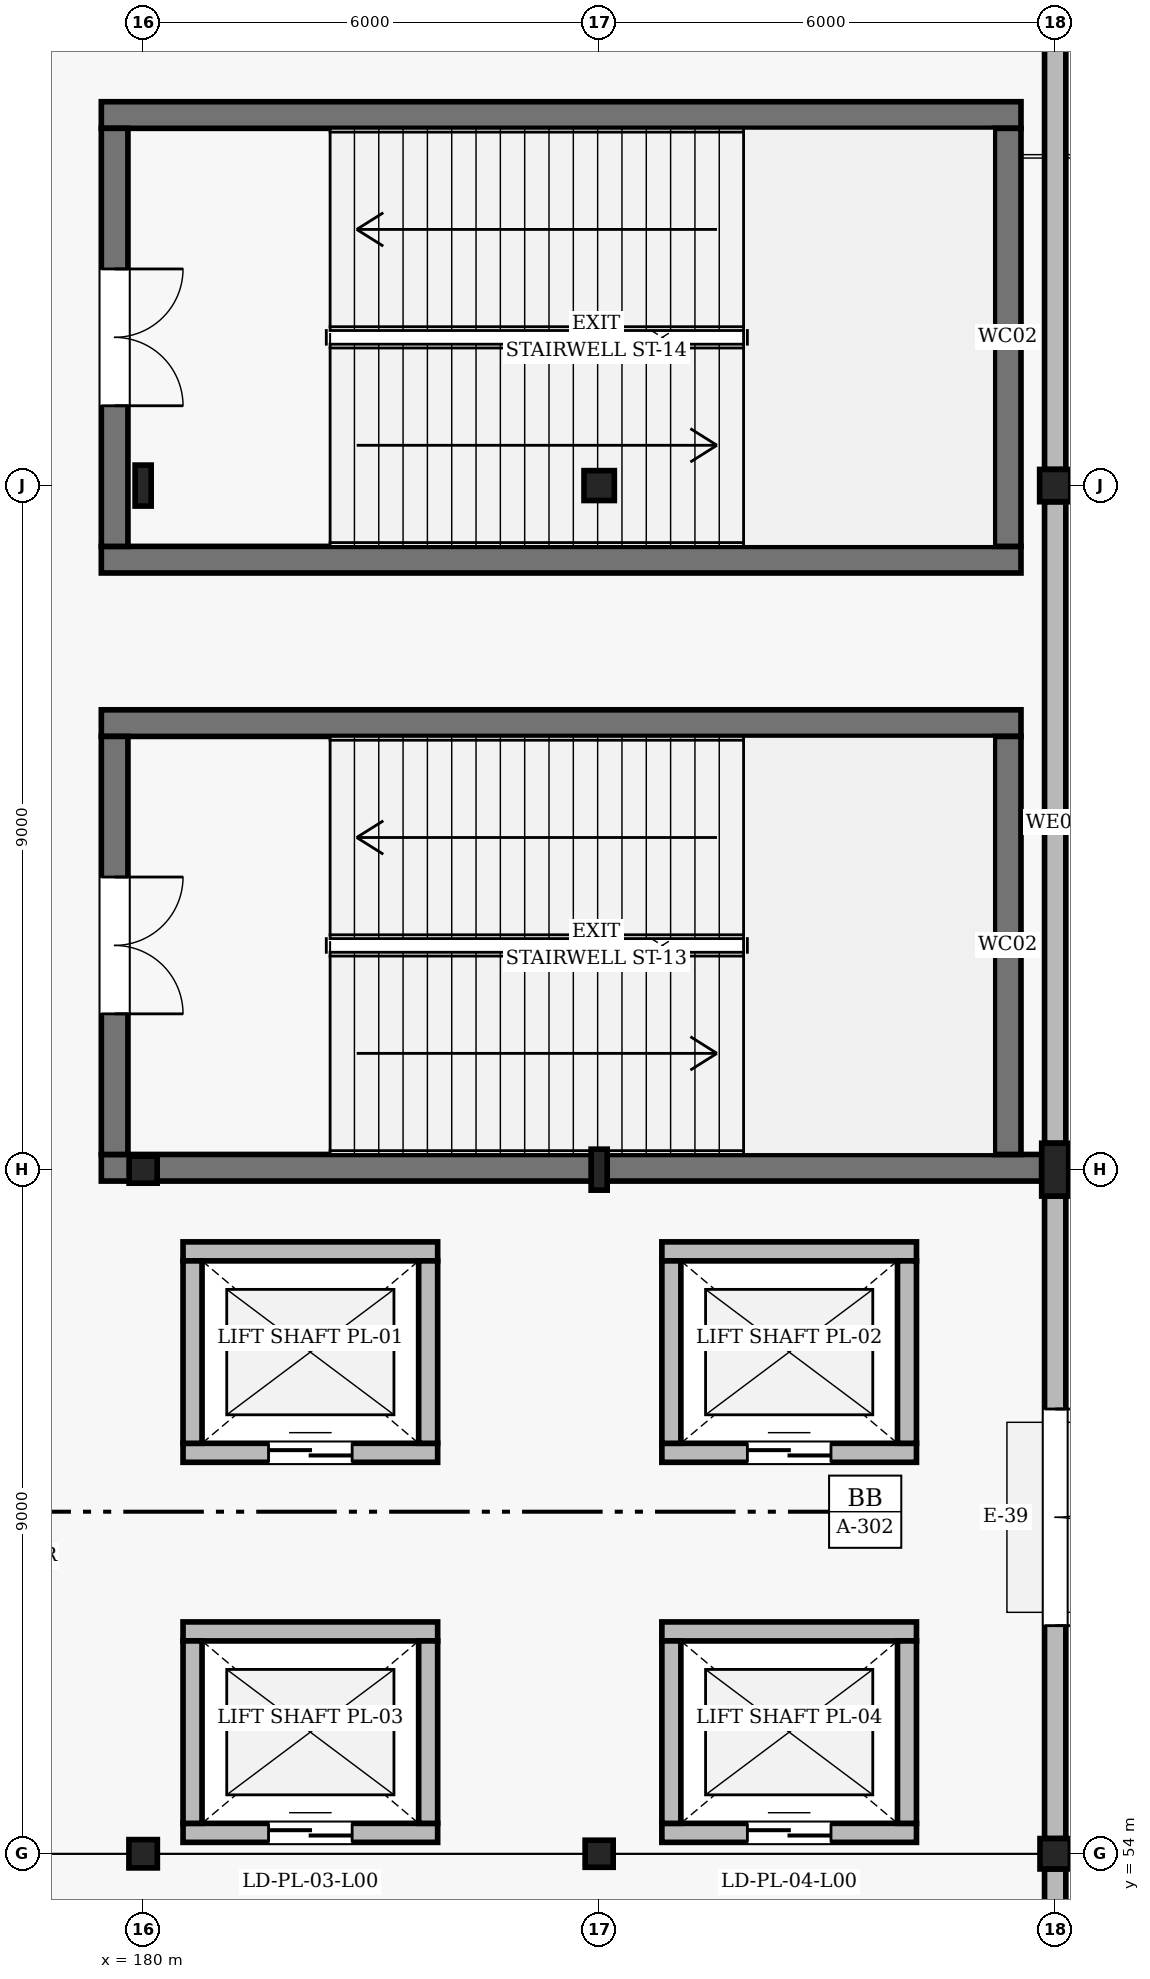
"""IFC4 building model, lengths in metres.
Left out: names, types, materials, properties, quantities, classifications, styles, units other than length and angle.
Written with IfcOpenShell. Run it as: python <this file> out.ifc"""

import sys

from ifc_helpers import new_model, si_unit, direction, frame, frame_2d, origin, origin_2d, place, context, subcontext, project, spatial, rectangle, hollow_rectangle, i_section, extrude, element, fill, save


model = new_model("IFC4")
c1 = context("Model", 3, precision=1e-05, world=origin(), true_north=direction((0.0, 1.0)))
c2 = subcontext(c1, "Body", "Model", "MODEL_VIEW")
j1 = project(units=[si_unit("LENGTHUNIT", "METRE"), si_unit("PLANEANGLEUNIT", "RADIAN")], contexts=[c1])
p1 = place(None, origin())
s1 = spatial("IfcSite", under=j1, at=p1, CompositionType="ELEMENT")
p2 = place(p1, origin())
s2 = spatial("IfcBuilding", under=s1, at=p2, CompositionType="ELEMENT")
p3 = place(p2, origin())
s3 = spatial("IfcBuildingStorey", under=s2, at=p3, CompositionType="ELEMENT", Elevation=0.0)
p4 = place(p3, frame((180.0, 54.0, 0.0), z_axis=(0.0, 0.0, 1.0), x_axis=(1.0, 0.0, 0.0)))
e1 = element("IfcColumn", 1, at=p4, inside=s3, PredefinedType="COLUMN", context=c2, shape_type="SweptSolid", body=[
    extrude(i_section(OverallWidth=0.374, OverallDepth=0.372, WebThickness=0.016, FlangeThickness=0.026, FilletRadius=0.016, at=origin_2d()), origin(), (0.0, 0.0, 1.0), 5.4),
])
p5 = place(p3, frame((180.0, 63.0, 0.0), z_axis=(0.0, 0.0, 1.0), x_axis=(1.0, 0.0, 0.0)))
e2 = element("IfcColumn", 2, at=p5, inside=s3, PredefinedType="COLUMN", context=c2, shape_type="SweptSolid", body=[
    extrude(i_section(OverallWidth=0.369, OverallDepth=0.356, WebThickness=0.011, FlangeThickness=0.018, FilletRadius=0.015, at=origin_2d()), origin(), (0.0, 0.0, 1.0), 5.4),
])
p6 = place(p3, frame((180.0, 72.0, 0.0), z_axis=(0.0, 0.0, 1.0), x_axis=(1.0, 0.0, 0.0)))
e3 = element("IfcColumn", 3, at=p6, inside=s3, PredefinedType="COLUMN", context=c2, shape_type="SweptSolid", body=[
    extrude(i_section(OverallWidth=0.211, OverallDepth=0.539, WebThickness=0.012, FlangeThickness=0.019, FilletRadius=0.014, at=origin_2d()), origin(), (0.0, 0.0, 1.0), 5.4),
])
p7 = place(p3, frame((186.0, 54.0, 0.0), z_axis=(0.0, 0.0, 1.0), x_axis=(1.0, 0.0, 0.0)))
e4 = element("IfcColumn", 4, at=p7, inside=s3, PredefinedType="COLUMN", context=c2, shape_type="SweptSolid", body=[
    extrude(i_section(OverallWidth=0.369, OverallDepth=0.356, WebThickness=0.011, FlangeThickness=0.018, FilletRadius=0.015, at=origin_2d()), origin(), (0.0, 0.0, 1.0), 5.4),
])
p8 = place(p3, frame((186.0, 63.0, 0.0), z_axis=(0.0, 0.0, 1.0), x_axis=(1.0, 0.0, 0.0)))
e5 = element("IfcColumn", 5, at=p8, inside=s3, PredefinedType="COLUMN", context=c2, shape_type="SweptSolid", body=[
    extrude(i_section(OverallWidth=0.211, OverallDepth=0.539, WebThickness=0.012, FlangeThickness=0.019, FilletRadius=0.014, at=origin_2d()), origin(), (0.0, 0.0, 1.0), 5.4),
])
p9 = place(p3, frame((186.0, 72.0, 0.0), z_axis=(0.0, 0.0, 1.0), x_axis=(1.0, 0.0, 0.0)))
e6 = element("IfcColumn", 6, at=p9, inside=s3, PredefinedType="COLUMN", context=c2, shape_type="SweptSolid", body=[
    extrude(i_section(OverallWidth=0.399, OverallDepth=0.393, WebThickness=0.023, FlangeThickness=0.037, FilletRadius=0.018, at=origin_2d()), origin(), (0.0, 0.0, 1.0), 5.4),
])
p10 = place(p3, frame((192.0, 54.0, 0.0), z_axis=(0.0, 0.0, 1.0), x_axis=(1.0, 0.0, 0.0)))
e7 = element("IfcColumn", 7, at=p10, inside=s3, PredefinedType="COLUMN", context=c2, shape_type="SweptSolid", body=[
    extrude(hollow_rectangle(XDim=0.4, YDim=0.4, WallThickness=0.016, InnerFilletRadius=0.016, OuterFilletRadius=0.032, at=origin_2d()), origin(), (0.0, 0.0, 1.0), 5.4),
])
p11 = place(p3, frame((192.0, 63.0, 0.0), z_axis=(0.0, 0.0, 1.0), x_axis=(1.0, 0.0, 0.0)))
e8 = element("IfcColumn", 8, at=p11, inside=s3, PredefinedType="COLUMN", context=c2, shape_type="SweptSolid", body=[
    extrude(i_section(OverallWidth=0.355, OverallDepth=0.695, WebThickness=0.015, FlangeThickness=0.025, FilletRadius=0.018, at=origin_2d()), origin(), (0.0, 0.0, 1.0), 5.4),
])
p12 = place(p3, frame((192.0, 72.0, 0.0), z_axis=(0.0, 0.0, 1.0), x_axis=(1.0, 0.0, 0.0)))
e9 = element("IfcColumn", 9, at=p12, inside=s3, PredefinedType="COLUMN", context=c2, shape_type="SweptSolid", body=[
    extrude(i_section(OverallWidth=0.409, OverallDepth=0.425, WebThickness=0.031, FlangeThickness=0.049, FilletRadius=0.02, at=origin_2d()), origin(), (0.0, 0.0, 1.0), 5.4),
])
p13 = place(p3, frame((192.0, 53.8, 0.0), z_axis=(0.0, 0.0, 1.0), x_axis=(0.0, -1.0, 0.0)))
e10 = element("IfcWall", 10, at=p13, inside=s3, PredefinedType="SOLIDWALL", context=c2, shape_type="SweptSolid", body=[
    extrude(rectangle(XDim=8.25, YDim=0.28, at=frame_2d((4.125, 0.0))), origin(), (0.0, 0.0, 1.0), 4.626),
])
p14 = place(p13, frame((2.75, 0.0, 0.0)))
e11 = element("IfcOpeningElement", 11, at=p14, cuts=e10, PredefinedType="OPENING", context=c2, shape_type="SweptSolid", body=[
    extrude(rectangle(XDim=2.75, YDim=2.58, at=frame_2d((1.375, 1.29))), frame((0.0, 0.15, 0.0), z_axis=(0.0, -1.0, 0.0), x_axis=(1.0, 0.0, 0.0)), (0.0, 0.0, 1.0), 0.3),
])
p15 = place(p3, frame((192.0, 62.653, 0.0), z_axis=(0.0, 0.0, 1.0), x_axis=(0.0, -1.0, 0.0)))
e12 = element("IfcWall", 12, at=p15, inside=s3, PredefinedType="SOLIDWALL", context=c2, shape_type="SweptSolid", body=[
    extrude(rectangle(XDim=8.453, YDim=0.28, at=frame_2d((4.226, 0.0))), origin(), (0.0, 0.0, 1.0), 4.699),
])
p16 = place(p15, frame((2.801, 0.0, 0.0)))
e13 = element("IfcOpeningElement", 13, at=p16, cuts=e12, PredefinedType="OPENING", context=c2, shape_type="SweptSolid", body=[
    extrude(rectangle(XDim=2.85, YDim=2.62, at=frame_2d((1.425, 1.31))), frame((0.0, 0.15, 0.0), z_axis=(0.0, -1.0, 0.0), x_axis=(1.0, 0.0, 0.0)), (0.0, 0.0, 1.0), 0.3),
])
p17 = place(p3, frame((192.0, 71.788, 0.0), z_axis=(0.0, 0.0, 1.0), x_axis=(0.0, -1.0, 0.0)))
e14 = element("IfcWall", 14, at=p17, inside=s3, PredefinedType="SOLIDWALL", context=c2, shape_type="SweptSolid", body=[
    extrude(rectangle(XDim=8.44, YDim=0.28, at=frame_2d((4.22, 0.0))), origin(), (0.0, 0.0, 1.0), 4.865),
])
p18 = place(p3, frame((192.0, 80.45, 0.0), z_axis=(0.0, 0.0, 1.0), x_axis=(0.0, -1.0, 0.0)))
e15 = element("IfcWall", 15, at=p18, inside=s3, PredefinedType="SOLIDWALL", context=c2, shape_type="SweptSolid", body=[
    extrude(rectangle(XDim=8.238, YDim=0.28, at=frame_2d((4.119, 0.0))), origin(), (0.0, 0.0, 1.0), 4.626),
])
p19 = place(p3, frame((179.45, 63.025, 0.0), z_axis=(0.0, 0.0, 1.0), x_axis=(1.0, 0.0, 0.0)))
e16 = element("IfcWall", 16, at=p19, inside=s3, PredefinedType="SHEAR", context=c2, shape_type="SweptSolid", body=[
    extrude(rectangle(XDim=12.373, YDim=0.35, at=frame_2d((6.186, 0.0))), origin(), (0.0, 0.0, 1.0), 5.18),
])
p20 = place(p3, frame((191.55, 68.875, 0.0), z_axis=(0.0, 0.0, 1.0), x_axis=(-1.0, 0.0, 0.0)))
e17 = element("IfcWall", 17, at=p20, inside=s3, PredefinedType="SHEAR", context=c2, shape_type="SweptSolid", body=[
    extrude(rectangle(XDim=12.1, YDim=0.35, at=frame_2d((6.05, 0.0))), origin(), (0.0, 0.0, 1.0), 5.18),
])
p21 = place(p3, frame((179.625, 68.7, 0.0), z_axis=(0.0, 0.0, 1.0), x_axis=(0.0, -1.0, 0.0)))
e18 = element("IfcWall", 18, at=p21, inside=s3, PredefinedType="SHEAR", context=c2, shape_type="SweptSolid", body=[
    extrude(rectangle(XDim=5.5, YDim=0.35, at=frame_2d((2.75, 0.0))), origin(), (0.0, 0.0, 1.0), 5.18),
])
p22 = place(p21, frame((1.85, 0.0, 0.0)))
e19 = element("IfcOpeningElement", 19, at=p22, cuts=e18, PredefinedType="OPENING", context=c2, shape_type="SweptSolid", body=[
    extrude(rectangle(XDim=1.8, YDim=2.2, at=frame_2d((0.9, 1.1))), frame((0.0, 0.185, 0.0), z_axis=(0.0, -1.0, 0.0), x_axis=(1.0, 0.0, 0.0)), (0.0, 0.0, 1.0), 0.37),
])
p23 = place(p3, frame((191.375, 63.2, 0.0), z_axis=(0.0, 0.0, 1.0), x_axis=(0.0, 1.0, 0.0)))
e20 = element("IfcWall", 20, at=p23, inside=s3, PredefinedType="SHEAR", context=c2, shape_type="SweptSolid", body=[
    extrude(rectangle(XDim=5.5, YDim=0.35, at=frame_2d((2.75, 0.0))), origin(), (0.0, 0.0, 1.0), 5.18),
])
for number, where, z_axis, x_axis in (
    (21, (179.45, 71.025, 0.0), (0.0, 0.0, 1.0), (1.0, 0.0, 0.0)),
    (22, (191.55, 76.875, 0.0), (0.0, 0.0, 1.0), (-1.0, 0.0, 0.0)),
):
    element("IfcWall", number, at=place(p3, frame(where, z_axis=z_axis, x_axis=x_axis)), inside=s3, PredefinedType="SHEAR", context=c2, shape_type="SweptSolid", body=[
        extrude(rectangle(XDim=12.1, YDim=0.35, at=frame_2d((6.05, 0.0))), origin(), (0.0, 0.0, 1.0), 5.18),
    ])
p24 = place(p3, frame((179.625, 76.7, 0.0), z_axis=(0.0, 0.0, 1.0), x_axis=(0.0, -1.0, 0.0)))
e23 = element("IfcWall", 23, at=p24, inside=s3, PredefinedType="SHEAR", context=c2, shape_type="SweptSolid", body=[
    extrude(rectangle(XDim=5.5, YDim=0.35, at=frame_2d((2.75, 0.0))), origin(), (0.0, 0.0, 1.0), 5.18),
])
p25 = place(p24, frame((1.85, 0.0, 0.0)))
e24 = element("IfcOpeningElement", 24, at=p25, cuts=e23, PredefinedType="OPENING", context=c2, shape_type="SweptSolid", body=[
    extrude(rectangle(XDim=1.8, YDim=2.2, at=frame_2d((0.9, 1.1))), frame((0.0, 0.185, 0.0), z_axis=(0.0, -1.0, 0.0), x_axis=(1.0, 0.0, 0.0)), (0.0, 0.0, 1.0), 0.37),
])
p26 = place(p3, frame((191.375, 71.2, 0.0), z_axis=(0.0, 0.0, 1.0), x_axis=(0.0, 1.0, 0.0)))
e25 = element("IfcWall", 25, at=p26, inside=s3, PredefinedType="SHEAR", context=c2, shape_type="SweptSolid", body=[
    extrude(rectangle(XDim=5.5, YDim=0.35, at=frame_2d((2.75, 0.0))), origin(), (0.0, 0.0, 1.0), 5.18),
])
p27 = place(p3, frame((180.525, 59.275, 0.0), z_axis=(0.0, 0.0, 1.0), x_axis=(1.0, 0.0, 0.0)))
e26 = element("IfcWall", 26, at=p27, inside=s3, PredefinedType="SOLIDWALL", context=c2, shape_type="SweptSolid", body=[
    extrude(rectangle(XDim=3.35, YDim=0.25, at=frame_2d((1.675, 0.0))), origin(), (0.0, 0.0, 1.0), 5.18),
])
p28 = place(p27, frame((1.125, 0.0, 0.0)))
e27 = element("IfcOpeningElement", 27, at=p28, cuts=e26, PredefinedType="OPENING", context=c2, shape_type="SweptSolid", body=[
    extrude(rectangle(XDim=1.1, YDim=2.2, at=frame_2d((0.55, 1.1))), frame((0.0, 0.135, 0.0), z_axis=(0.0, -1.0, 0.0), x_axis=(1.0, 0.0, 0.0)), (0.0, 0.0, 1.0), 0.27),
])
p29 = place(p3, frame((183.875, 61.925, 0.0), z_axis=(0.0, 0.0, 1.0), x_axis=(-1.0, 0.0, 0.0)))
e28 = element("IfcWall", 28, at=p29, inside=s3, PredefinedType="SOLIDWALL", context=c2, shape_type="SweptSolid", body=[
    extrude(rectangle(XDim=3.35, YDim=0.25, at=frame_2d((1.675, 0.0))), origin(), (0.0, 0.0, 1.0), 5.18),
])
for number, where, z_axis, x_axis in (
    (29, (180.65, 61.8, 0.0), (0.0, 0.0, 1.0), (0.0, -1.0, 0.0)),
    (30, (183.75, 59.4, 0.0), (0.0, 0.0, 1.0), (0.0, 1.0, 0.0)),
):
    element("IfcWall", number, at=place(p3, frame(where, z_axis=z_axis, x_axis=x_axis)), inside=s3, PredefinedType="SOLIDWALL", context=c2, shape_type="SweptSolid", body=[
        extrude(rectangle(XDim=2.4, YDim=0.25, at=frame_2d((1.2, 0.0))), origin(), (0.0, 0.0, 1.0), 5.18),
    ])
p30 = place(p3, frame((186.825, 59.275, 0.0), z_axis=(0.0, 0.0, 1.0), x_axis=(1.0, 0.0, 0.0)))
e31 = element("IfcWall", 31, at=p30, inside=s3, PredefinedType="SOLIDWALL", context=c2, shape_type="SweptSolid", body=[
    extrude(rectangle(XDim=3.35, YDim=0.25, at=frame_2d((1.675, 0.0))), origin(), (0.0, 0.0, 1.0), 5.18),
])
p31 = place(p30, frame((1.125, 0.0, 0.0)))
e32 = element("IfcOpeningElement", 32, at=p31, cuts=e31, PredefinedType="OPENING", context=c2, shape_type="SweptSolid", body=[
    extrude(rectangle(XDim=1.1, YDim=2.2, at=frame_2d((0.55, 1.1))), frame((0.0, 0.135, 0.0), z_axis=(0.0, -1.0, 0.0), x_axis=(1.0, 0.0, 0.0)), (0.0, 0.0, 1.0), 0.27),
])
p32 = place(p3, frame((190.175, 61.925, 0.0), z_axis=(0.0, 0.0, 1.0), x_axis=(-1.0, 0.0, 0.0)))
e33 = element("IfcWall", 33, at=p32, inside=s3, PredefinedType="SOLIDWALL", context=c2, shape_type="SweptSolid", body=[
    extrude(rectangle(XDim=3.35, YDim=0.25, at=frame_2d((1.675, 0.0))), origin(), (0.0, 0.0, 1.0), 5.18),
])
for number, where, z_axis, x_axis in (
    (34, (186.95, 61.8, 0.0), (0.0, 0.0, 1.0), (0.0, -1.0, 0.0)),
    (35, (190.05, 59.4, 0.0), (0.0, 0.0, 1.0), (0.0, 1.0, 0.0)),
):
    element("IfcWall", number, at=place(p3, frame(where, z_axis=z_axis, x_axis=x_axis)), inside=s3, PredefinedType="SOLIDWALL", context=c2, shape_type="SweptSolid", body=[
        extrude(rectangle(XDim=2.4, YDim=0.25, at=frame_2d((1.2, 0.0))), origin(), (0.0, 0.0, 1.0), 5.18),
    ])
p33 = place(p3, frame((180.525, 54.275, 0.0), z_axis=(0.0, 0.0, 1.0), x_axis=(1.0, 0.0, 0.0)))
e36 = element("IfcWall", 36, at=p33, inside=s3, PredefinedType="SOLIDWALL", context=c2, shape_type="SweptSolid", body=[
    extrude(rectangle(XDim=3.35, YDim=0.25, at=frame_2d((1.675, 0.0))), origin(), (0.0, 0.0, 1.0), 4.392),
])
p34 = place(p33, frame((1.125, 0.0, 0.0)))
e37 = element("IfcOpeningElement", 37, at=p34, cuts=e36, PredefinedType="OPENING", context=c2, shape_type="SweptSolid", body=[
    extrude(rectangle(XDim=1.1, YDim=2.2, at=frame_2d((0.55, 1.1))), frame((0.0, 0.135, 0.0), z_axis=(0.0, -1.0, 0.0), x_axis=(1.0, 0.0, 0.0)), (0.0, 0.0, 1.0), 0.27),
])
p35 = place(p3, frame((183.875, 56.925, 0.0), z_axis=(0.0, 0.0, 1.0), x_axis=(-1.0, 0.0, 0.0)))
e38 = element("IfcWall", 38, at=p35, inside=s3, PredefinedType="SOLIDWALL", context=c2, shape_type="SweptSolid", body=[
    extrude(rectangle(XDim=3.35, YDim=0.25, at=frame_2d((1.675, 0.0))), origin(), (0.0, 0.0, 1.0), 4.857),
])
for number, where, z_axis, x_axis in (
    (39, (180.65, 56.8, 0.0), (0.0, 0.0, 1.0), (0.0, -1.0, 0.0)),
    (40, (183.75, 54.4, 0.0), (0.0, 0.0, 1.0), (0.0, 1.0, 0.0)),
):
    element("IfcWall", number, at=place(p3, frame(where, z_axis=z_axis, x_axis=x_axis)), inside=s3, PredefinedType="SOLIDWALL", context=c2, shape_type="SweptSolid", body=[
        extrude(rectangle(XDim=2.4, YDim=0.25, at=frame_2d((1.2, 0.0))), origin(), (0.0, 0.0, 1.0), 4.392),
    ])
p36 = place(p3, frame((186.825, 54.275, 0.0), z_axis=(0.0, 0.0, 1.0), x_axis=(1.0, 0.0, 0.0)))
e41 = element("IfcWall", 41, at=p36, inside=s3, PredefinedType="SOLIDWALL", context=c2, shape_type="SweptSolid", body=[
    extrude(rectangle(XDim=3.35, YDim=0.25, at=frame_2d((1.675, 0.0))), origin(), (0.0, 0.0, 1.0), 4.47),
])
p37 = place(p36, frame((1.125, 0.0, 0.0)))
e42 = element("IfcOpeningElement", 42, at=p37, cuts=e41, PredefinedType="OPENING", context=c2, shape_type="SweptSolid", body=[
    extrude(rectangle(XDim=1.1, YDim=2.2, at=frame_2d((0.55, 1.1))), frame((0.0, 0.135, 0.0), z_axis=(0.0, -1.0, 0.0), x_axis=(1.0, 0.0, 0.0)), (0.0, 0.0, 1.0), 0.27),
])
p38 = place(p3, frame((190.175, 56.925, 0.0), z_axis=(0.0, 0.0, 1.0), x_axis=(-1.0, 0.0, 0.0)))
e43 = element("IfcWall", 43, at=p38, inside=s3, PredefinedType="SOLIDWALL", context=c2, shape_type="SweptSolid", body=[
    extrude(rectangle(XDim=3.35, YDim=0.25, at=frame_2d((1.675, 0.0))), origin(), (0.0, 0.0, 1.0), 4.557),
])
for number, where, z_axis, x_axis in (
    (44, (186.95, 56.8, 0.0), (0.0, 0.0, 1.0), (0.0, -1.0, 0.0)),
    (45, (190.05, 54.4, 0.0), (0.0, 0.0, 1.0), (0.0, 1.0, 0.0)),
):
    element("IfcWall", number, at=place(p3, frame(where, z_axis=z_axis, x_axis=x_axis)), inside=s3, PredefinedType="SOLIDWALL", context=c2, shape_type="SweptSolid", body=[
        extrude(rectangle(XDim=2.4, YDim=0.25, at=frame_2d((1.2, 0.0))), origin(), (0.0, 0.0, 1.0), 4.47),
    ])
p39 = place(p16, origin())
e46 = element("IfcDoor", 46, at=p39, inside=s3, OperationType="DOUBLE_DOOR_SINGLE_SWING", PredefinedType="DOOR", context=c2, shape_type="SweptSolid", body=[
    extrude(rectangle(XDim=2.85, YDim=2.62, at=frame_2d((1.425, 1.31))), frame((0.0, 0.025, 0.0), z_axis=(0.0, -1.0, 0.0), x_axis=(1.0, 0.0, 0.0)), (0.0, 0.0, 1.0), 0.05),
])
fill(e13, e46)
p40 = place(p22, origin())
e47 = element("IfcDoor", 47, at=p40, inside=s3, OperationType="DOUBLE_DOOR_SINGLE_SWING", PredefinedType="DOOR", context=c2, shape_type="SweptSolid", body=[
    extrude(rectangle(XDim=1.8, YDim=2.2, at=frame_2d((0.9, 1.1))), frame((0.0, 0.025, 0.0), z_axis=(0.0, -1.0, 0.0), x_axis=(1.0, 0.0, 0.0)), (0.0, 0.0, 1.0), 0.05),
])
fill(e19, e47)
p41 = place(p25, origin())
e48 = element("IfcDoor", 48, at=p41, inside=s3, OperationType="DOUBLE_DOOR_SINGLE_SWING", PredefinedType="DOOR", context=c2, shape_type="SweptSolid", body=[
    extrude(rectangle(XDim=1.8, YDim=2.2, at=frame_2d((0.9, 1.1))), frame((0.0, 0.025, 0.0), z_axis=(0.0, -1.0, 0.0), x_axis=(1.0, 0.0, 0.0)), (0.0, 0.0, 1.0), 0.05),
])
fill(e24, e48)
p42 = place(p28, origin())
e49 = element("IfcDoor", 49, at=p42, inside=s3, OperationType="DOUBLE_DOOR_SLIDING", PredefinedType="DOOR", context=c2, shape_type="SweptSolid", body=[
    extrude(rectangle(XDim=1.1, YDim=2.2, at=frame_2d((0.55, 1.1))), frame((0.0, 0.025, 0.0), z_axis=(0.0, -1.0, 0.0), x_axis=(1.0, 0.0, 0.0)), (0.0, 0.0, 1.0), 0.05),
])
fill(e27, e49)
p43 = place(p31, origin())
e50 = element("IfcDoor", 50, at=p43, inside=s3, OperationType="DOUBLE_DOOR_SLIDING", PredefinedType="DOOR", context=c2, shape_type="SweptSolid", body=[
    extrude(rectangle(XDim=1.1, YDim=2.2, at=frame_2d((0.55, 1.1))), frame((0.0, 0.025, 0.0), z_axis=(0.0, -1.0, 0.0), x_axis=(1.0, 0.0, 0.0)), (0.0, 0.0, 1.0), 0.05),
])
fill(e32, e50)
p44 = place(p34, origin())
e51 = element("IfcDoor", 51, at=p44, inside=s3, OperationType="DOUBLE_DOOR_SLIDING", PredefinedType="DOOR", context=c2, shape_type="SweptSolid", body=[
    extrude(rectangle(XDim=1.1, YDim=2.2, at=frame_2d((0.55, 1.1))), frame((0.0, 0.025, 0.0), z_axis=(0.0, -1.0, 0.0), x_axis=(1.0, 0.0, 0.0)), (0.0, 0.0, 1.0), 0.05),
])
fill(e37, e51)
p45 = place(p37, origin())
e52 = element("IfcDoor", 52, at=p45, inside=s3, OperationType="DOUBLE_DOOR_SLIDING", PredefinedType="DOOR", context=c2, shape_type="SweptSolid", body=[
    extrude(rectangle(XDim=1.1, YDim=2.2, at=frame_2d((0.55, 1.1))), frame((0.0, 0.025, 0.0), z_axis=(0.0, -1.0, 0.0), x_axis=(1.0, 0.0, 0.0)), (0.0, 0.0, 1.0), 0.05),
])
fill(e42, e52)
save(model, sys.argv[1])
